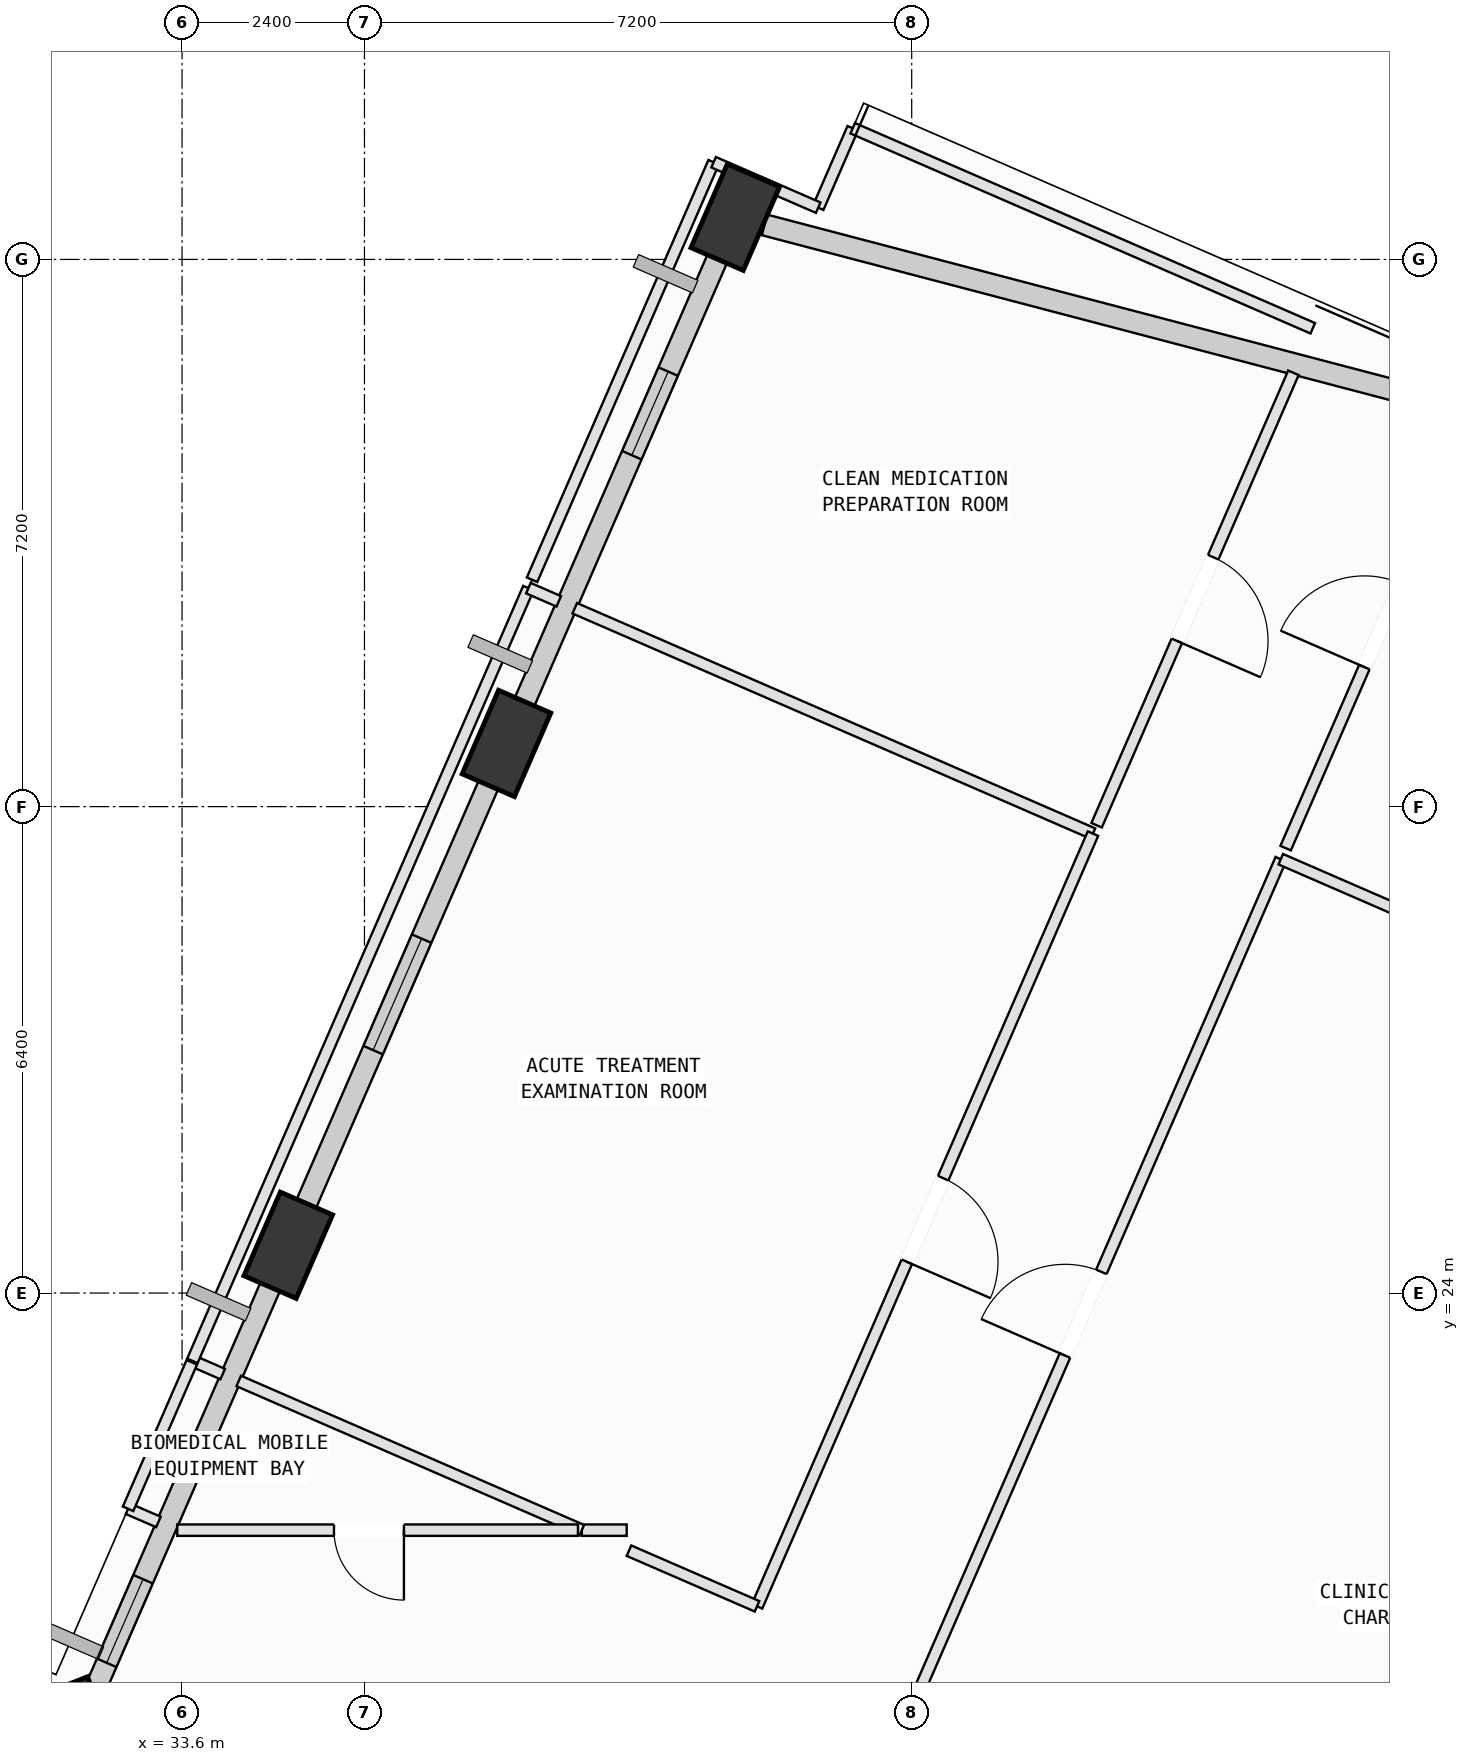
"""IFC4 building model, lengths in metres.
Left out: names, types, materials, properties, quantities, classifications, styles, units other than length and angle.
Written with IfcOpenShell. Run it as: python <this file> out.ifc"""

import sys

from ifc_helpers import new_model, si_unit, direction, frame, frame_2d, origin, origin_2d, place, context, subcontext, project, spatial, rectangle, extrude, element, fill, save


model = new_model("IFC4")
c1 = context("Model", 3, precision=1e-05, world=origin(), true_north=direction((0.0, 1.0)))
c2 = subcontext(c1, "Body", "Model", "MODEL_VIEW")
j1 = project(units=[si_unit("LENGTHUNIT", "METRE"), si_unit("PLANEANGLEUNIT", "RADIAN")], contexts=[c1])
p1 = place(None, origin())
s1 = spatial("IfcSite", under=j1, at=p1, CompositionType="ELEMENT")
p2 = place(p1, origin())
s2 = spatial("IfcBuilding", under=s1, at=p2, CompositionType="ELEMENT")
p3 = place(p2, frame((0.0, 0.0, 312.6)))
s3 = spatial("IfcBuildingStorey", under=s2, at=p3, CompositionType="ELEMENT", Elevation=312.6)
for number, where, z_axis, x_axis in (
    (1, (40.879, 38.155, 0.002), (0.0, 0.0, 1.0), (0.399, 0.917, 0.0)),
    (2, (37.868, 31.231, 0.002), (0.0, 0.0, 1.0), (0.399, 0.917, 0.0)),
    (3, (34.998, 24.628, 0.002), (0.0, 0.0, 1.0), (0.399, 0.917, 0.0)),
    (4, (32.226, 18.255, 0.002), (0.0, 0.0, 1.0), (-0.367, 0.93, 0.0)),
):
    element("IfcColumn", number, at=place(p3, frame(where, z_axis=z_axis, x_axis=x_axis)), inside=s3, PredefinedType="COLUMN", context=c2, shape_type="SweptSolid", body=[
        extrude(rectangle(XDim=1.2, YDim=0.75, at=origin_2d()), origin(), (0.0, 0.0, 1.0), 3.996),
    ])
p4 = place(p3, frame((41.264, 38.054, 0.0), z_axis=(0.0, 0.0, 1.0), x_axis=(0.967228971308, -0.253905724755, 0.0)))
e5 = element("IfcWall", 5, at=p4, inside=s3, PredefinedType="SOLIDWALL", context=c2, shape_type="SweptSolid", body=[
    extrude(rectangle(XDim=9.02, YDim=0.28, at=frame_2d((4.51, 0.0))), origin(), (0.0, 0.0, 1.0), 3.265),
])
p5 = place(p3, frame((38.027, 31.596, 0.0), z_axis=(0.0, 0.0, 1.0), x_axis=(0.398764437463, 0.917053391802, 0.0)))
e6 = element("IfcWall", 6, at=p5, inside=s3, PredefinedType="SOLIDWALL", context=c2, shape_type="SweptSolid", body=[
    extrude(rectangle(XDim=6.755, YDim=0.28, at=frame_2d((3.377, 0.0))), origin(), (0.0, 0.0, 1.0), 3.265),
])
p6 = place(p5, frame((3.738, 0.0, 0.75)))
e7 = element("IfcOpeningElement", 7, at=p6, cuts=e6, PredefinedType="OPENING", context=c2, shape_type="SweptSolid", body=[
    extrude(rectangle(XDim=1.2, YDim=1.75, at=frame_2d((0.6, 0.875))), frame((0.0, 0.15, 0.0), z_axis=(0.0, -1.0, 0.0), x_axis=(1.0, 0.0, 0.0)), (0.0, 0.0, 1.0), 0.3),
])
p7 = place(p3, frame((35.156, 24.993, 0.0), z_axis=(0.0, 0.0, 1.0), x_axis=(0.398758169539, 0.917056117272, 0.0)))
e8 = element("IfcWall", 8, at=p7, inside=s3, PredefinedType="SOLIDWALL", context=c2, shape_type="SweptSolid", body=[
    extrude(rectangle(XDim=6.405, YDim=0.28, at=frame_2d((3.202, 0.0))), origin(), (0.0, 0.0, 1.0), 3.265),
])
p8 = place(p7, frame((2.402, 0.0, 0.75)))
e9 = element("IfcOpeningElement", 9, at=p8, cuts=e8, PredefinedType="OPENING", context=c2, shape_type="SweptSolid", body=[
    extrude(rectangle(XDim=1.6, YDim=1.95, at=frame_2d((0.8, 0.975))), frame((0.0, 0.15, 0.0), z_axis=(0.0, -1.0, 0.0), x_axis=(1.0, 0.0, 0.0)), (0.0, 0.0, 1.0), 0.3),
])
p9 = place(p3, frame((32.385, 18.619, 0.0), z_axis=(0.0, 0.0, 1.0), x_axis=(0.398753668733, 0.917058074318, 0.0)))
e10 = element("IfcWall", 10, at=p9, inside=s3, PredefinedType="SOLIDWALL", context=c2, shape_type="SweptSolid", body=[
    extrude(rectangle(XDim=6.155, YDim=0.28, at=frame_2d((3.078, 0.0))), origin(), (0.0, 0.0, 1.0), 3.265),
])
p10 = place(p9, frame((0.561, 0.0, 0.75)))
e11 = element("IfcOpeningElement", 11, at=p10, cuts=e10, PredefinedType="OPENING", context=c2, shape_type="SweptSolid", body=[
    extrude(rectangle(XDim=1.2, YDim=1.75, at=frame_2d((0.6, 0.875))), frame((0.0, 0.15, 0.0), z_axis=(0.0, -1.0, 0.0), x_axis=(1.0, 0.0, 0.0)), (0.0, 0.0, 1.0), 0.3),
])
p11 = place(p3, frame((25.484, 21.187, 0.0), z_axis=(0.0, 0.0, 1.0), x_axis=(0.917060568388, -0.398747932794, 0.0)))
e12 = element("IfcWall", 12, at=p11, inside=s3, PredefinedType="SOLIDWALL", context=c2, shape_type="SweptSolid", body=[
    extrude(rectangle(XDim=6.955, YDim=0.28, at=frame_2d((3.478, 0.0))), origin(), (0.0, 0.0, 1.0), 2.765),
])
p12 = place(p3, frame((42.856, 17.749, 0.0), z_axis=(0.0, 0.0, 1.0), x_axis=(0.398751440491, 0.917059043195, 0.0)))
e13 = element("IfcWall", 13, at=p12, inside=s3, PredefinedType="PARTITIONING", context=c2, shape_type="SweptSolid", body=[
    extrude(rectangle(XDim=13.041, YDim=0.15, at=frame_2d((6.52, 0.0))), origin(), (0.0, 0.0, 1.0), 3.78),
])
p13 = place(p12, frame((5.92, 0.0, 0.0)))
e14 = element("IfcOpeningElement", 14, at=p13, cuts=e13, PredefinedType="OPENING", context=c2, shape_type="SweptSolid", body=[
    extrude(rectangle(XDim=1.2, YDim=2.15, at=frame_2d((0.6, 1.075))), frame((0.0, 0.085, 0.0), z_axis=(0.0, -1.0, 0.0), x_axis=(1.0, 0.0, 0.0)), (0.0, 0.0, 1.0), 0.17),
])
p14 = place(p3, frame((48.056, 29.708, 0.0), z_axis=(0.0, 0.0, 1.0), x_axis=(0.917068265028, -0.398730231207, 0.0)))
e15 = element("IfcWall", 15, at=p14, inside=s3, PredefinedType="PARTITIONING", context=c2, shape_type="SweptSolid", body=[
    extrude(rectangle(XDim=10.834, YDim=0.15, at=frame_2d((5.417, 0.0))), origin(), (0.0, 0.0, 1.0), 3.78),
])
p15 = place(p3, frame((48.12, 29.854, 0.0), z_axis=(0.0, 0.0, 1.0), x_axis=(0.398700984872, 0.917080980428, 0.0)))
e16 = element("IfcWall", 16, at=p15, inside=s3, PredefinedType="PARTITIONING", context=c2, shape_type="SweptSolid", body=[
    extrude(rectangle(XDim=6.395, YDim=0.15, at=frame_2d((3.198, 0.0))), origin(), (0.0, 0.0, 1.0), 2.765),
])
p16 = place(p15, frame((2.598, 0.0, 0.0)))
e17 = element("IfcOpeningElement", 17, at=p16, cuts=e16, PredefinedType="OPENING", context=c2, shape_type="SweptSolid", body=[
    extrude(rectangle(XDim=1.2, YDim=2.15, at=frame_2d((0.6, 1.075))), frame((0.0, 0.085, 0.0), z_axis=(0.0, -1.0, 0.0), x_axis=(1.0, 0.0, 0.0)), (0.0, 0.0, 1.0), 0.17),
])
p17 = place(p3, frame((39.45, 20.88, 0.0), z_axis=(0.0, 0.0, 1.0), x_axis=(-1.0, 0.0, 0.0)))
e18 = element("IfcWall", 18, at=p17, inside=s3, PredefinedType="PARTITIONING", context=c2, shape_type="SweptSolid", body=[
    extrude(rectangle(XDim=0.59, YDim=0.15, at=frame_2d((0.295, 0.0))), origin(), (0.0, 0.0, 1.0), 3.78),
])
p18 = place(p3, frame((38.86, 20.88, 0.0), z_axis=(0.0, 0.0, 1.0), x_axis=(-0.917036147656, 0.39880409212, 0.0)))
e19 = element("IfcWall", 19, at=p18, inside=s3, PredefinedType="PARTITIONING", context=c2, shape_type="SweptSolid", body=[
    extrude(rectangle(XDim=4.923, YDim=0.15, at=frame_2d((2.461, 0.0))), origin(), (0.0, 0.0, 1.0), 3.78),
])
p19 = place(p3, frame((34.135, 22.934, 0.0), z_axis=(0.0, 0.0, 1.0), x_axis=(-0.916748651636, 0.399464528742, 0.0)))
e20 = element("IfcWall", 20, at=p19, inside=s3, PredefinedType="PARTITIONING", context=c2, shape_type="SweptSolid", body=[
    extrude(rectangle(XDim=0.435, YDim=0.15, at=frame_2d((0.218, 0.0))), origin(), (0.0, 0.0, 1.0), 3.78),
])
p20 = place(p3, frame((33.736, 23.108, 0.0), z_axis=(0.0, 0.0, 1.0), x_axis=(0.398761541239, 0.917054651168, 0.0)))
e21 = element("IfcWall", 21, at=p20, inside=s3, PredefinedType="PARTITIONING", context=c2, shape_type="SweptSolid", body=[
    extrude(rectangle(XDim=11.087, YDim=0.15, at=frame_2d((5.543, 0.0))), origin(), (0.0, 0.0, 1.0), 3.78),
])
p21 = place(p3, frame((38.157, 33.275, 0.0), z_axis=(0.0, 0.0, 1.0), x_axis=(0.916748651636, -0.399464528742, 0.0)))
e22 = element("IfcWall", 22, at=p21, inside=s3, PredefinedType="PARTITIONING", context=c2, shape_type="SweptSolid", body=[
    extrude(rectangle(XDim=0.435, YDim=0.15, at=frame_2d((0.218, 0.0))), origin(), (0.0, 0.0, 1.0), 3.78),
])
p22 = place(p3, frame((38.767, 33.01, 0.0), z_axis=(0.0, 0.0, 1.0), x_axis=(0.917030896956, -0.398816165707, 0.0)))
e23 = element("IfcWall", 23, at=p22, inside=s3, PredefinedType="PARTITIONING", context=c2, shape_type="SweptSolid", body=[
    extrude(rectangle(XDim=7.435, YDim=0.15, at=frame_2d((3.717, 0.0))), origin(), (0.0, 0.0, 1.0), 3.78),
])
p23 = place(p3, frame((45.585, 30.045, 0.0), z_axis=(0.0, 0.0, 1.0), x_axis=(-0.398687458661, -0.91708686083, 0.0)))
e24 = element("IfcWall", 24, at=p23, inside=s3, PredefinedType="PARTITIONING", context=c2, shape_type="SweptSolid", body=[
    extrude(rectangle(XDim=11.086, YDim=0.15, at=frame_2d((5.543, 0.0))), origin(), (0.0, 0.0, 1.0), 2.765),
])
p24 = place(p23, frame((4.943, 0.0, 0.0)))
e25 = element("IfcOpeningElement", 25, at=p24, cuts=e24, PredefinedType="OPENING", context=c2, shape_type="SweptSolid", body=[
    extrude(rectangle(XDim=1.2, YDim=2.15, at=frame_2d((0.6, 1.075))), frame((0.0, 0.085, 0.0), z_axis=(0.0, -1.0, 0.0), x_axis=(1.0, 0.0, 0.0)), (0.0, 0.0, 1.0), 0.17),
])
p25 = place(p3, frame((41.165, 19.878, 0.0), z_axis=(0.0, 0.0, 1.0), x_axis=(-0.917160874805, 0.398517163654, 0.0)))
e26 = element("IfcWall", 26, at=p25, inside=s3, PredefinedType="PARTITIONING", context=c2, shape_type="SweptSolid", body=[
    extrude(rectangle(XDim=1.837, YDim=0.15, at=frame_2d((0.918, 0.0))), origin(), (0.0, 0.0, 1.0), 3.78),
])
p26 = place(p3, frame((41.97, 38.281, 0.0), z_axis=(0.0, 0.0, 1.0), x_axis=(0.398569395059, 0.917138177878, 0.0)))
e27 = element("IfcWall", 27, at=p26, inside=s3, PredefinedType="PARTITIONING", context=c2, shape_type="SweptSolid", body=[
    extrude(rectangle(XDim=1.139, YDim=0.15, at=frame_2d((0.57, 0.0))), origin(), (0.0, 0.0, 1.0), 3.78),
])
p27 = place(p3, frame((42.424, 39.326, 0.0), z_axis=(0.0, 0.0, 1.0), x_axis=(0.917064175576, -0.3987396367, 0.0)))
e28 = element("IfcWall", 28, at=p27, inside=s3, PredefinedType="PARTITIONING", context=c2, shape_type="SweptSolid", body=[
    extrude(rectangle(XDim=6.6, YDim=0.15, at=frame_2d((3.3, 0.0))), origin(), (0.0, 0.0, 1.0), 3.78),
])
p28 = place(p3, frame((48.222, 36.108, 0.0), z_axis=(0.0, 0.0, 1.0), x_axis=(-0.398811373886, -0.9170329809, 0.0)))
e29 = element("IfcWall", 29, at=p28, inside=s3, PredefinedType="PARTITIONING", context=c2, shape_type="SweptSolid", body=[
    extrude(rectangle(XDim=6.491, YDim=0.15, at=frame_2d((3.246, 0.0))), origin(), (0.0, 0.0, 1.0), 2.765),
])
p29 = place(p28, frame((2.646, 0.0, 0.0)))
e30 = element("IfcOpeningElement", 30, at=p29, cuts=e29, PredefinedType="OPENING", context=c2, shape_type="SweptSolid", body=[
    extrude(rectangle(XDim=1.2, YDim=2.15, at=frame_2d((0.6, 1.075))), frame((0.0, 0.085, 0.0), z_axis=(0.0, -1.0, 0.0), x_axis=(1.0, 0.0, 0.0)), (0.0, 0.0, 1.0), 0.17),
])
p30 = place(p3, frame((38.205, 33.385, 0.0), z_axis=(0.0, 0.0, 1.0), x_axis=(0.398763364975, 0.917053858153, 0.0)))
e31 = element("IfcWall", 31, at=p30, inside=s3, PredefinedType="PARTITIONING", context=c2, shape_type="SweptSolid", body=[
    extrude(rectangle(XDim=5.991, YDim=0.15, at=frame_2d((2.995, 0.0))), origin(), (0.0, 0.0, 1.0), 3.78),
])
p31 = place(p3, frame((40.594, 38.879, 0.0), z_axis=(0.0, 0.0, 1.0), x_axis=(0.91715541112, -0.398529737728, 0.0)))
e32 = element("IfcWall", 32, at=p31, inside=s3, PredefinedType="PARTITIONING", context=c2, shape_type="SweptSolid", body=[
    extrude(rectangle(XDim=1.5, YDim=0.15, at=frame_2d((0.75, 0.0))), origin(), (0.0, 0.0, 1.0), 3.265),
])
p32 = place(p3, frame((38.809, 20.88, 0.0), z_axis=(0.0, 0.0, 1.0), x_axis=(-1.0, 0.0, 0.0)))
e33 = element("IfcWall", 33, at=p32, inside=s3, PredefinedType="PARTITIONING", context=c2, shape_type="SweptSolid", body=[
    extrude(rectangle(XDim=5.272, YDim=0.15, at=frame_2d((2.636, 0.0))), origin(), (0.0, 0.0, 1.0), 3.78),
])
p33 = place(p32, frame((2.29, 0.0, 0.0)))
e34 = element("IfcOpeningElement", 34, at=p33, cuts=e33, PredefinedType="OPENING", context=c2, shape_type="SweptSolid", body=[
    extrude(rectangle(XDim=0.92, YDim=2.1, at=frame_2d((0.46, 1.05))), frame((0.0, 0.085, 0.0), z_axis=(0.0, -1.0, 0.0), x_axis=(1.0, 0.0, 0.0)), (0.0, 0.0, 1.0), 0.17),
])
p34 = place(p3, frame((33.289, 20.988, 0.0), z_axis=(0.0, 0.0, 1.0), x_axis=(-0.917657976039, 0.397371160267, 0.0)))
e35 = element("IfcWall", 35, at=p34, inside=s3, PredefinedType="PARTITIONING", context=c2, shape_type="SweptSolid", body=[
    extrude(rectangle(XDim=0.435, YDim=0.15, at=frame_2d((0.218, 0.0))), origin(), (0.0, 0.0, 1.0), 3.78),
])
p35 = place(p3, frame((32.89, 21.161, 0.0), z_axis=(0.0, 0.0, 1.0), x_axis=(0.399027500697, 0.91693895854, 0.0)))
e36 = element("IfcWall", 36, at=p35, inside=s3, PredefinedType="PARTITIONING", context=c2, shape_type="SweptSolid", body=[
    extrude(rectangle(XDim=2.103, YDim=0.15, at=frame_2d((1.051, 0.0))), origin(), (0.0, 0.0, 1.0), 3.78),
])
p36 = place(p6, origin())
e37 = element("IfcWindow", 37, at=p36, inside=s3, PartitioningType="SINGLE_PANEL", PredefinedType="WINDOW", context=c2, shape_type="SweptSolid", body=[
    extrude(rectangle(XDim=1.2, YDim=1.75, at=frame_2d((0.6, 0.875))), frame((0.0, 0.03, 0.0), z_axis=(0.0, -1.0, 0.0), x_axis=(1.0, 0.0, 0.0)), (0.0, 0.0, 1.0), 0.06),
])
fill(e7, e37)
p37 = place(p8, origin())
e38 = element("IfcWindow", 38, at=p37, inside=s3, PartitioningType="SINGLE_PANEL", PredefinedType="WINDOW", context=c2, shape_type="SweptSolid", body=[
    extrude(rectangle(XDim=1.6, YDim=1.95, at=frame_2d((0.8, 0.975))), frame((0.0, 0.03, 0.0), z_axis=(0.0, -1.0, 0.0), x_axis=(1.0, 0.0, 0.0)), (0.0, 0.0, 1.0), 0.06),
])
fill(e9, e38)
p38 = place(p10, origin())
e39 = element("IfcWindow", 39, at=p38, inside=s3, PartitioningType="SINGLE_PANEL", PredefinedType="WINDOW", context=c2, shape_type="SweptSolid", body=[
    extrude(rectangle(XDim=1.2, YDim=1.75, at=frame_2d((0.6, 0.875))), frame((0.0, 0.03, 0.0), z_axis=(0.0, -1.0, 0.0), x_axis=(1.0, 0.0, 0.0)), (0.0, 0.0, 1.0), 0.06),
])
fill(e11, e39)
p39 = place(p13, origin())
e40 = element("IfcDoor", 40, at=p39, inside=s3, OperationType="SINGLE_SWING_LEFT", PredefinedType="DOOR", context=c2, shape_type="SweptSolid", body=[
    extrude(rectangle(XDim=1.2, YDim=2.15, at=frame_2d((0.6, 1.075))), frame((0.0, 0.025, 0.0), z_axis=(0.0, -1.0, 0.0), x_axis=(1.0, 0.0, 0.0)), (0.0, 0.0, 1.0), 0.05),
])
fill(e14, e40)
p40 = place(p16, origin())
e41 = element("IfcDoor", 41, at=p40, inside=s3, OperationType="SINGLE_SWING_LEFT", PredefinedType="DOOR", context=c2, shape_type="SweptSolid", body=[
    extrude(rectangle(XDim=1.2, YDim=2.15, at=frame_2d((0.6, 1.075))), frame((0.0, 0.025, 0.0), z_axis=(0.0, -1.0, 0.0), x_axis=(1.0, 0.0, 0.0)), (0.0, 0.0, 1.0), 0.05),
])
fill(e17, e41)
p41 = place(p24, origin())
e42 = element("IfcDoor", 42, at=p41, inside=s3, OperationType="SINGLE_SWING_RIGHT", PredefinedType="DOOR", context=c2, shape_type="SweptSolid", body=[
    extrude(rectangle(XDim=1.2, YDim=2.15, at=frame_2d((0.6, 1.075))), frame((0.0, 0.025, 0.0), z_axis=(0.0, -1.0, 0.0), x_axis=(1.0, 0.0, 0.0)), (0.0, 0.0, 1.0), 0.05),
])
fill(e25, e42)
p42 = place(p29, origin())
e43 = element("IfcDoor", 43, at=p42, inside=s3, OperationType="SINGLE_SWING_RIGHT", PredefinedType="DOOR", context=c2, shape_type="SweptSolid", body=[
    extrude(rectangle(XDim=1.2, YDim=2.15, at=frame_2d((0.6, 1.075))), frame((0.0, 0.025, 0.0), z_axis=(0.0, -1.0, 0.0), x_axis=(1.0, 0.0, 0.0)), (0.0, 0.0, 1.0), 0.05),
])
fill(e30, e43)
p43 = place(p33, origin())
e44 = element("IfcDoor", 44, at=p43, inside=s3, OperationType="SINGLE_SWING_LEFT", PredefinedType="DOOR", context=c2, shape_type="SweptSolid", body=[
    extrude(rectangle(XDim=0.92, YDim=2.1, at=frame_2d((0.46, 1.05))), frame((0.0, 0.025, 0.0), z_axis=(0.0, -1.0, 0.0), x_axis=(1.0, 0.0, 0.0)), (0.0, 0.0, 1.0), 0.05),
])
fill(e34, e44)
save(model, sys.argv[1])
